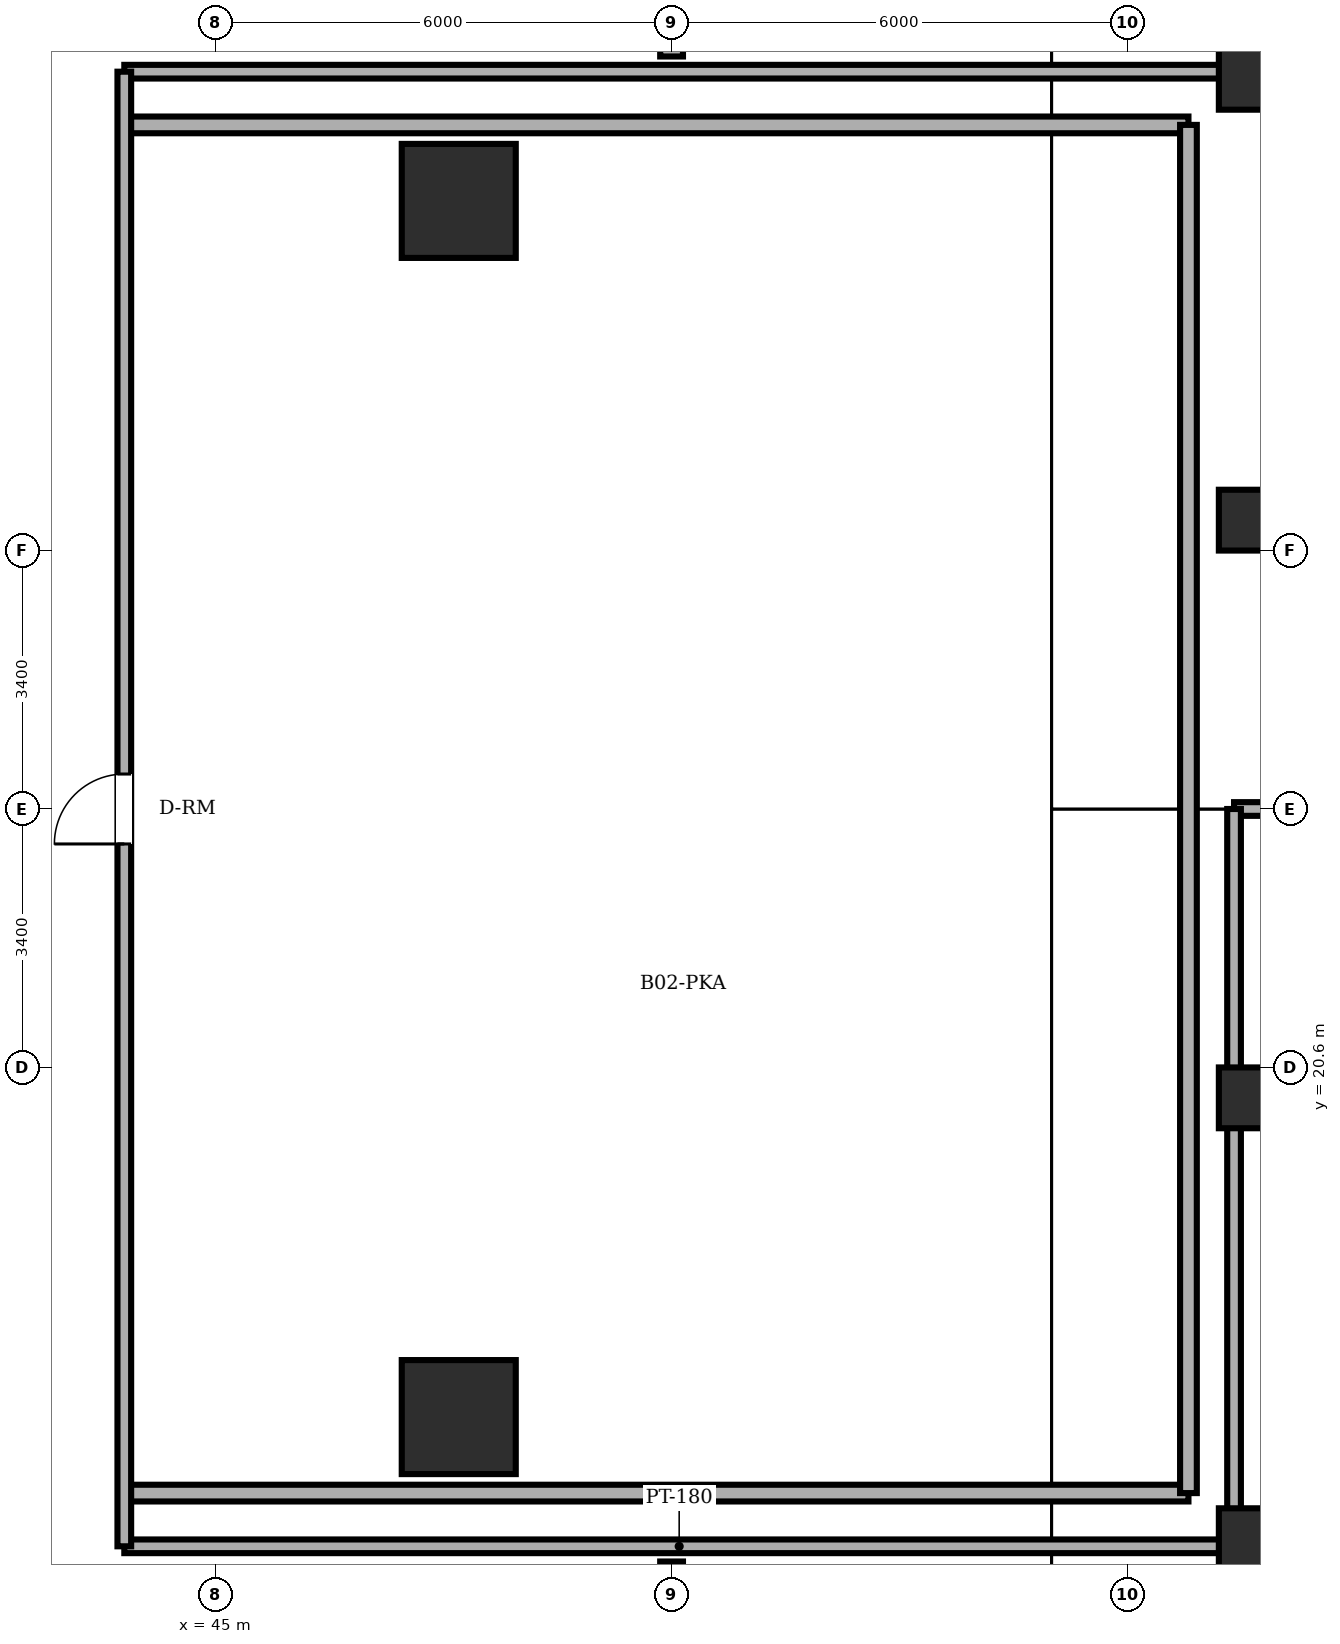
"""IFC4 building model, lengths in metres.
Left out: names, types, materials, properties, quantities, classifications, styles, units other than length and angle.
Written with IfcOpenShell. Run it as: python <this file> out.ifc"""

import sys

from ifc_helpers import new_model, si_unit, direction, frame, frame_2d, origin, origin_2d, place, context, subcontext, project, spatial, rectangle, circle, extrude, element, fill, save


model = new_model("IFC4")
c1 = context("Model", 3, precision=1e-05, world=origin(), true_north=direction((0.0, 1.0)))
c2 = subcontext(c1, "Body", "Model", "MODEL_VIEW")
j1 = project(units=[si_unit("LENGTHUNIT", "METRE"), si_unit("PLANEANGLEUNIT", "RADIAN")], contexts=[c1])
p1 = place(None, origin())
s1 = spatial("IfcSite", under=j1, at=p1, CompositionType="ELEMENT")
p2 = place(p1, origin())
s2 = spatial("IfcBuilding", under=s1, at=p2, CompositionType="ELEMENT")
p3 = place(p2, frame((0.0, 0.0, -8.4)))
s3 = spatial("IfcBuildingStorey", under=s2, at=p3, CompositionType="ELEMENT", Elevation=-8.4)
for number, where, z_axis, x_axis in (
    (1, (48.2, 16.0, 0.0), (0.0, 0.0, 1.0), (1.0, 0.0, 0.0)),
    (2, (48.2, 32.0, 0.0), (0.0, 0.0, 1.0), (1.0, 0.0, 0.0)),
):
    element("IfcColumn", number, at=place(p3, frame(where, z_axis=z_axis, x_axis=x_axis)), inside=s3, PredefinedType="COLUMN", context=c2, shape_type="SweptSolid", body=[
        extrude(circle(Radius=0.75, at=origin_2d()), origin(), (0.0, 0.0, 1.0), 4.2),
    ])
for number, where, z_axis, x_axis in (
    (3, (58.6, 20.2, 0.0), (0.0, 0.0, 1.0), (1.0, 0.0, 0.0)),
    (4, (58.6, 27.8, 0.0), (0.0, 0.0, 1.0), (1.0, 0.0, 0.0)),
    (5, (58.6, 14.4, 0.0), (0.0, 0.0, 1.0), (1.0, 0.0, 0.0)),
    (6, (58.6, 33.6, 0.0), (0.0, 0.0, 1.0), (1.0, 0.0, 0.0)),
):
    element("IfcColumn", number, at=place(p3, frame(where, z_axis=z_axis, x_axis=x_axis)), inside=s3, PredefinedType="COLUMN", context=c2, shape_type="SweptSolid", body=[
        extrude(rectangle(XDim=0.8, YDim=0.8, at=origin_2d()), origin(), (0.0, 0.0, 1.0), 4.2),
    ])
p4 = place(p3, frame((43.8, 14.3, 0.0), z_axis=(0.0, 0.0, 1.0), x_axis=(1.0, 0.0, 0.0)))
e7 = element("IfcWall", 7, at=p4, inside=s3, PredefinedType="PARTITIONING", context=c2, shape_type="SweptSolid", body=[
    extrude(rectangle(XDim=14.6, YDim=0.18, at=frame_2d((7.3, 0.0))), origin(), (0.0, 0.0, 1.0), 3.95),
])
p5 = place(p3, frame((43.8, 15.0, 0.0), z_axis=(0.0, 0.0, 1.0), x_axis=(1.0, 0.0, 0.0)))
e8 = element("IfcWall", 8, at=p5, inside=s3, PredefinedType="PARTITIONING", context=c2, shape_type="SweptSolid", body=[
    extrude(rectangle(XDim=14.0, YDim=0.22, at=frame_2d((7.0, 0.0))), origin(), (0.0, 0.0, 1.0), 3.95),
])
p6 = place(p3, frame((58.4, 24.0, 0.0), z_axis=(0.0, 0.0, 1.0), x_axis=(1.0, 0.0, 0.0)))
e9 = element("IfcWall", 9, at=p6, inside=s3, PredefinedType="PARTITIONING", context=c2, shape_type="SweptSolid", body=[
    extrude(rectangle(XDim=6.5, YDim=0.18, at=frame_2d((3.25, 0.0))), origin(), (0.0, 0.0, 1.0), 3.95),
])
p7 = place(p3, frame((43.8, 33.0, 0.0), z_axis=(0.0, 0.0, 1.0), x_axis=(1.0, 0.0, 0.0)))
e10 = element("IfcWall", 10, at=p7, inside=s3, PredefinedType="PARTITIONING", context=c2, shape_type="SweptSolid", body=[
    extrude(rectangle(XDim=14.0, YDim=0.22, at=frame_2d((7.0, 0.0))), origin(), (0.0, 0.0, 1.0), 3.95),
])
p8 = place(p3, frame((43.8, 33.7, 0.0), z_axis=(0.0, 0.0, 1.0), x_axis=(1.0, 0.0, 0.0)))
e11 = element("IfcWall", 11, at=p8, inside=s3, PredefinedType="PARTITIONING", context=c2, shape_type="SweptSolid", body=[
    extrude(rectangle(XDim=14.6, YDim=0.18, at=frame_2d((7.3, 0.0))), origin(), (0.0, 0.0, 1.0), 3.95),
])
p9 = place(p3, frame((43.8, 14.3, 0.0), z_axis=(0.0, 0.0, 1.0), x_axis=(0.0, 1.0, 0.0)))
e12 = element("IfcWall", 12, at=p9, inside=s3, PredefinedType="PARTITIONING", context=c2, shape_type="SweptSolid", body=[
    extrude(rectangle(XDim=19.4, YDim=0.18, at=frame_2d((9.7, 0.0))), origin(), (0.0, 0.0, 1.0), 3.95),
])
p10 = place(p9, frame((9.24, 0.0, 0.0)))
e13 = element("IfcOpeningElement", 13, at=p10, cuts=e12, PredefinedType="OPENING", context=c2, shape_type="SweptSolid", body=[
    extrude(rectangle(XDim=0.92, YDim=2.1, at=frame_2d((0.46, 1.05))), frame((0.0, 0.1, 0.0), z_axis=(0.0, -1.0, 0.0), x_axis=(1.0, 0.0, 0.0)), (0.0, 0.0, 1.0), 0.2),
])
p11 = place(p3, frame((57.8, 15.0, 0.0), z_axis=(0.0, 0.0, 1.0), x_axis=(0.0, 1.0, 0.0)))
e14 = element("IfcWall", 14, at=p11, inside=s3, PredefinedType="PARTITIONING", context=c2, shape_type="SweptSolid", body=[
    extrude(rectangle(XDim=18.0, YDim=0.22, at=frame_2d((9.0, 0.0))), origin(), (0.0, 0.0, 1.0), 3.95),
])
p12 = place(p3, frame((58.4, 14.3, 0.0), z_axis=(0.0, 0.0, 1.0), x_axis=(0.0, 1.0, 0.0)))
e15 = element("IfcWall", 15, at=p12, inside=s3, PredefinedType="PARTITIONING", context=c2, shape_type="SweptSolid", body=[
    extrude(rectangle(XDim=9.7, YDim=0.18, at=frame_2d((4.85, 0.0))), origin(), (0.0, 0.0, 1.0), 2.732),
])
p13 = place(p3, frame((58.4, 33.7, 0.0), z_axis=(0.0, 0.0, 1.0), x_axis=(0.0, 1.0, 0.0)))
e16 = element("IfcWall", 16, at=p13, inside=s3, PredefinedType="PARTITIONING", context=c2, shape_type="SweptSolid", body=[
    extrude(rectangle(XDim=6.1, YDim=0.18, at=frame_2d((3.05, 0.0))), origin(), (0.0, 0.0, 1.0), 2.732),
])
p14 = place(p3, frame((51.0, 8.4, 0.0), z_axis=(0.0, 0.0, 1.0), x_axis=(0.0, 1.0, 0.0)))
e17 = element("IfcWall", 17, at=p14, inside=s3, PredefinedType="SOLIDWALL", context=c2, shape_type="SweptSolid", body=[
    extrude(rectangle(XDim=5.7, YDim=0.3, at=frame_2d((2.85, 0.0))), origin(), (0.0, 0.0, 1.0), 3.95),
])
p15 = place(p14, frame((1.35, 0.0, 0.0)))
e18 = element("IfcOpeningElement", 18, at=p15, cuts=e17, PredefinedType="OPENING", context=c2, shape_type="SweptSolid", body=[
    extrude(rectangle(XDim=3.0, YDim=2.55, at=frame_2d((1.5, 1.275))), frame((0.0, 0.16, 0.0), z_axis=(0.0, -1.0, 0.0), x_axis=(1.0, 0.0, 0.0)), (0.0, 0.0, 1.0), 0.32),
])
p16 = place(p3, frame((51.0, 33.9, 0.0), z_axis=(0.0, 0.0, 1.0), x_axis=(0.0, 1.0, 0.0)))
e19 = element("IfcWall", 19, at=p16, inside=s3, PredefinedType="SOLIDWALL", context=c2, shape_type="SweptSolid", body=[
    extrude(rectangle(XDim=5.7, YDim=0.3, at=frame_2d((2.85, 0.0))), origin(), (0.0, 0.0, 1.0), 3.95),
])
p17 = place(p16, frame((1.35, 0.0, 0.0)))
e20 = element("IfcOpeningElement", 20, at=p17, cuts=e19, PredefinedType="OPENING", context=c2, shape_type="SweptSolid", body=[
    extrude(rectangle(XDim=3.0, YDim=2.55, at=frame_2d((1.5, 1.275))), frame((0.0, 0.16, 0.0), z_axis=(0.0, -1.0, 0.0), x_axis=(1.0, 0.0, 0.0)), (0.0, 0.0, 1.0), 0.32),
])
p18 = place(p10, origin())
e21 = element("IfcDoor", 21, at=p18, inside=s3, OperationType="SINGLE_SWING_LEFT", PredefinedType="DOOR", context=c2, shape_type="SweptSolid", body=[
    extrude(rectangle(XDim=0.92, YDim=2.1, at=frame_2d((0.46, 1.05))), frame((0.0, 0.025, 0.0), z_axis=(0.0, -1.0, 0.0), x_axis=(1.0, 0.0, 0.0)), (0.0, 0.0, 1.0), 0.05),
])
fill(e13, e21)
save(model, sys.argv[1])
